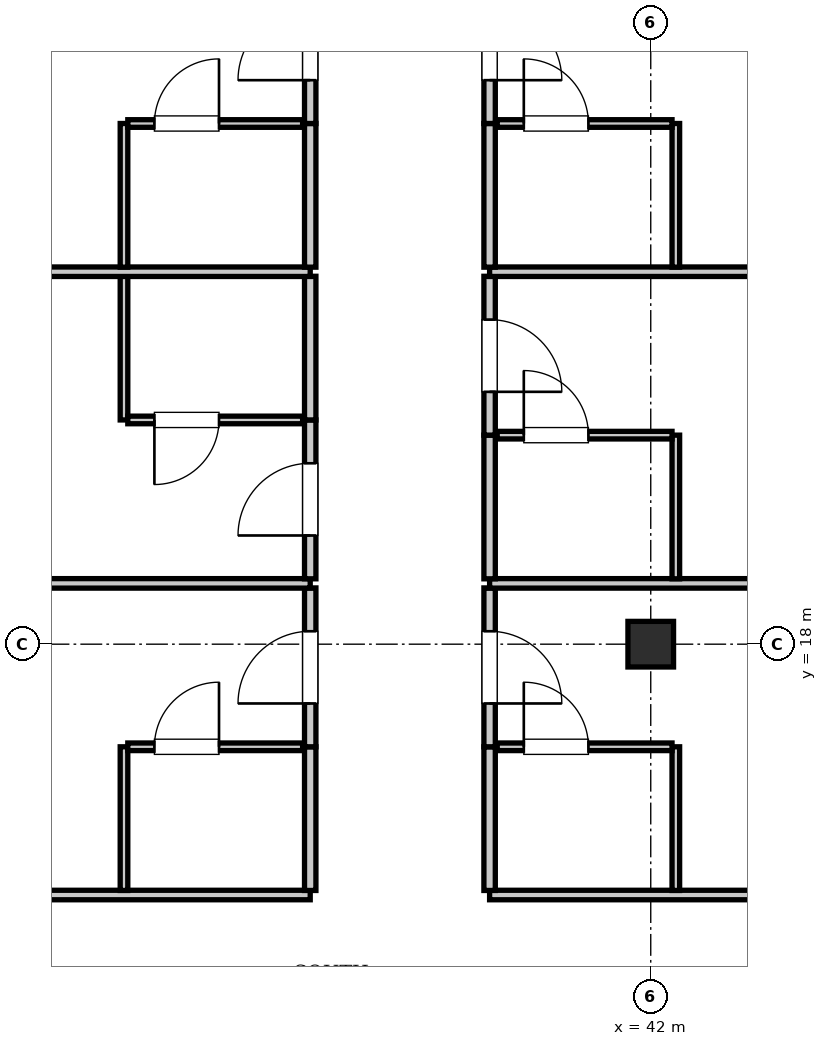
"""IFC4 building model, lengths in metres.
Left out: names, types, materials, properties, quantities, classifications, styles, units other than length and angle.
Written with IfcOpenShell. Run it as: python <this file> out.ifc"""

import sys

from ifc_helpers import new_model, si_unit, direction, frame, frame_2d, origin, origin_2d, place, context, subcontext, project, spatial, rectangle, i_section, extrude, element, fill, save


model = new_model("IFC4")
c1 = context("Model", 3, precision=1e-05, world=origin(), true_north=direction((0.0, 1.0)))
c2 = subcontext(c1, "Body", "Model", "MODEL_VIEW")
j1 = project(units=[si_unit("LENGTHUNIT", "METRE"), si_unit("PLANEANGLEUNIT", "RADIAN")], contexts=[c1])
p1 = place(None, origin())
s1 = spatial("IfcSite", under=j1, at=p1, CompositionType="ELEMENT")
p2 = place(p1, origin())
s2 = spatial("IfcBuilding", under=s1, at=p2, CompositionType="ELEMENT")
p3 = place(p2, frame((0.0, 0.0, 181.3)))
s3 = spatial("IfcBuildingStorey", under=s2, at=p3, CompositionType="ELEMENT", Elevation=181.3)
p4 = place(p3, frame((42.0, 18.0, 0.0), z_axis=(0.0, 0.0, 1.0), x_axis=(1.0, 0.0, 0.0)))
e1 = element("IfcColumn", 1, at=p4, inside=s3, PredefinedType="COLUMN", context=c2, shape_type="SweptSolid", body=[
    extrude(i_section(OverallWidth=0.6, OverallDepth=0.6, WebThickness=0.025, FlangeThickness=0.038, at=origin_2d()), origin(), (0.0, 0.0, 1.0), 3.85),
])
p5 = place(p3, frame((13.2, 14.7, 0.0), z_axis=(0.0, 0.0, 1.0), x_axis=(1.0, 0.0, 0.0)))
e2 = element("IfcWall", 2, at=p5, inside=s3, PredefinedType="PARTITIONING", context=c2, shape_type="SweptSolid", body=[
    extrude(rectangle(XDim=24.32, YDim=0.125, at=frame_2d((12.16, 0.0))), origin(), (0.0, 0.0, 1.0), 3.61),
])
p6 = place(p3, frame((39.88, 14.7, 0.0), z_axis=(0.0, 0.0, 1.0), x_axis=(1.0, 0.0, 0.0)))
e3 = element("IfcWall", 3, at=p6, inside=s3, PredefinedType="PARTITIONING", context=c2, shape_type="SweptSolid", body=[
    extrude(rectangle(XDim=22.52, YDim=0.125, at=frame_2d((11.26, 0.0))), origin(), (0.0, 0.0, 1.0), 3.61),
])
p7 = place(p3, frame((37.52, 14.76, 0.0), z_axis=(0.0, 0.0, 1.0), x_axis=(0.0, 1.0, 0.0)))
e4 = element("IfcWall", 4, at=p7, inside=s3, PredefinedType="PARTITIONING", context=c2, shape_type="SweptSolid", body=[
    extrude(rectangle(XDim=1.89, YDim=0.15, at=frame_2d((0.945, 0.0))), origin(), (0.0, 0.0, 1.0), 3.61),
])
p8 = place(p3, frame((37.52, 16.65, 0.0), z_axis=(0.0, 0.0, 1.0), x_axis=(0.0, 1.0, 0.0)))
e5 = element("IfcWall", 5, at=p8, inside=s3, PredefinedType="PARTITIONING", context=c2, shape_type="SweptSolid", body=[
    extrude(rectangle(XDim=2.09, YDim=0.15, at=frame_2d((1.045, 0.0))), origin(), (0.0, 0.0, 1.0), 3.61),
])
p9 = place(p8, frame((0.57, 0.0, 0.0)))
e6 = element("IfcOpeningElement", 6, at=p9, cuts=e5, PredefinedType="OPENING", context=c2, shape_type="SweptSolid", body=[
    extrude(rectangle(XDim=0.95, YDim=2.15, at=frame_2d((0.475, 1.075))), frame((0.0, 0.085, 0.0), z_axis=(0.0, -1.0, 0.0), x_axis=(1.0, 0.0, 0.0)), (0.0, 0.0, 1.0), 0.17),
])
p10 = place(p3, frame((35.07, 14.76, 0.0), z_axis=(0.0, 0.0, 1.0), x_axis=(0.0, 1.0, 0.0)))
e7 = element("IfcWall", 7, at=p10, inside=s3, PredefinedType="PARTITIONING", context=c2, shape_type="SweptSolid", body=[
    extrude(rectangle(XDim=1.89, YDim=0.1, at=frame_2d((0.945, 0.0))), origin(), (0.0, 0.0, 1.0), 3.61),
])
p11 = place(p3, frame((35.12, 16.65, 0.0), z_axis=(0.0, 0.0, 1.0), x_axis=(1.0, 0.0, 0.0)))
e8 = element("IfcWall", 8, at=p11, inside=s3, PredefinedType="PARTITIONING", context=c2, shape_type="SweptSolid", body=[
    extrude(rectangle(XDim=2.3, YDim=0.1, at=frame_2d((1.15, 0.0))), origin(), (0.0, 0.0, 1.0), 3.61),
])
p12 = place(p11, frame((0.35, 0.0, 0.0)))
e9 = element("IfcOpeningElement", 9, at=p12, cuts=e8, PredefinedType="OPENING", context=c2, shape_type="SweptSolid", body=[
    extrude(rectangle(XDim=0.85, YDim=2.1, at=frame_2d((0.425, 1.05))), frame((0.0, 0.06, 0.0), z_axis=(0.0, -1.0, 0.0), x_axis=(1.0, 0.0, 0.0)), (0.0, 0.0, 1.0), 0.12),
])
p13 = place(p3, frame((39.88, 14.76, 0.0), z_axis=(0.0, 0.0, 1.0), x_axis=(0.0, 1.0, 0.0)))
e10 = element("IfcWall", 10, at=p13, inside=s3, PredefinedType="PARTITIONING", context=c2, shape_type="SweptSolid", body=[
    extrude(rectangle(XDim=1.89, YDim=0.15, at=frame_2d((0.945, 0.0))), origin(), (0.0, 0.0, 1.0), 3.61),
])
p14 = place(p3, frame((39.88, 16.65, 0.0), z_axis=(0.0, 0.0, 1.0), x_axis=(0.0, 1.0, 0.0)))
e11 = element("IfcWall", 11, at=p14, inside=s3, PredefinedType="PARTITIONING", context=c2, shape_type="SweptSolid", body=[
    extrude(rectangle(XDim=2.09, YDim=0.15, at=frame_2d((1.045, 0.0))), origin(), (0.0, 0.0, 1.0), 3.61),
])
p15 = place(p14, frame((0.57, 0.0, 0.0)))
e12 = element("IfcOpeningElement", 12, at=p15, cuts=e11, PredefinedType="OPENING", context=c2, shape_type="SweptSolid", body=[
    extrude(rectangle(XDim=0.95, YDim=2.15, at=frame_2d((0.475, 1.075))), frame((0.0, 0.085, 0.0), z_axis=(0.0, -1.0, 0.0), x_axis=(1.0, 0.0, 0.0)), (0.0, 0.0, 1.0), 0.17),
])
p16 = place(p3, frame((42.33, 14.76, 0.0), z_axis=(0.0, 0.0, 1.0), x_axis=(0.0, 1.0, 0.0)))
e13 = element("IfcWall", 13, at=p16, inside=s3, PredefinedType="PARTITIONING", context=c2, shape_type="SweptSolid", body=[
    extrude(rectangle(XDim=1.89, YDim=0.1, at=frame_2d((0.945, 0.0))), origin(), (0.0, 0.0, 1.0), 3.61),
])
p17 = place(p3, frame((39.98, 16.65, 0.0), z_axis=(0.0, 0.0, 1.0), x_axis=(1.0, 0.0, 0.0)))
e14 = element("IfcWall", 14, at=p17, inside=s3, PredefinedType="PARTITIONING", context=c2, shape_type="SweptSolid", body=[
    extrude(rectangle(XDim=2.3, YDim=0.1, at=frame_2d((1.15, 0.0))), origin(), (0.0, 0.0, 1.0), 3.61),
])
p18 = place(p17, frame((0.35, 0.0, 0.0)))
e15 = element("IfcOpeningElement", 15, at=p18, cuts=e14, PredefinedType="OPENING", context=c2, shape_type="SweptSolid", body=[
    extrude(rectangle(XDim=0.85, YDim=2.1, at=frame_2d((0.425, 1.05))), frame((0.0, 0.06, 0.0), z_axis=(0.0, -1.0, 0.0), x_axis=(1.0, 0.0, 0.0)), (0.0, 0.0, 1.0), 0.12),
])
p19 = place(p3, frame((13.2, 18.8, 0.0), z_axis=(0.0, 0.0, 1.0), x_axis=(1.0, 0.0, 0.0)))
e16 = element("IfcWall", 16, at=p19, inside=s3, PredefinedType="PARTITIONING", context=c2, shape_type="SweptSolid", body=[
    extrude(rectangle(XDim=24.32, YDim=0.125, at=frame_2d((12.16, 0.0))), origin(), (0.0, 0.0, 1.0), 3.61),
])
p20 = place(p3, frame((39.88, 18.8, 0.0), z_axis=(0.0, 0.0, 1.0), x_axis=(1.0, 0.0, 0.0)))
e17 = element("IfcWall", 17, at=p20, inside=s3, PredefinedType="PARTITIONING", context=c2, shape_type="SweptSolid", body=[
    extrude(rectangle(XDim=22.52, YDim=0.125, at=frame_2d((11.26, 0.0))), origin(), (0.0, 0.0, 1.0), 3.61),
])
p21 = place(p3, frame((37.52, 18.86, 0.0), z_axis=(0.0, 0.0, 1.0), x_axis=(0.0, 1.0, 0.0)))
e18 = element("IfcWall", 18, at=p21, inside=s3, PredefinedType="PARTITIONING", context=c2, shape_type="SweptSolid", body=[
    extrude(rectangle(XDim=2.09, YDim=0.15, at=frame_2d((1.045, 0.0))), origin(), (0.0, 0.0, 1.0), 3.61),
])
p22 = place(p21, frame((0.57, 0.0, 0.0)))
e19 = element("IfcOpeningElement", 19, at=p22, cuts=e18, PredefinedType="OPENING", context=c2, shape_type="SweptSolid", body=[
    extrude(rectangle(XDim=0.95, YDim=2.15, at=frame_2d((0.475, 1.075))), frame((0.0, 0.085, 0.0), z_axis=(0.0, -1.0, 0.0), x_axis=(1.0, 0.0, 0.0)), (0.0, 0.0, 1.0), 0.17),
])
p23 = place(p3, frame((37.52, 20.95, 0.0), z_axis=(0.0, 0.0, 1.0), x_axis=(0.0, 1.0, 0.0)))
e20 = element("IfcWall", 20, at=p23, inside=s3, PredefinedType="PARTITIONING", context=c2, shape_type="SweptSolid", body=[
    extrude(rectangle(XDim=1.89, YDim=0.15, at=frame_2d((0.945, 0.0))), origin(), (0.0, 0.0, 1.0), 3.61),
])
p24 = place(p3, frame((35.07, 20.95, 0.0), z_axis=(0.0, 0.0, 1.0), x_axis=(0.0, 1.0, 0.0)))
e21 = element("IfcWall", 21, at=p24, inside=s3, PredefinedType="PARTITIONING", context=c2, shape_type="SweptSolid", body=[
    extrude(rectangle(XDim=1.89, YDim=0.1, at=frame_2d((0.945, 0.0))), origin(), (0.0, 0.0, 1.0), 3.61),
])
p25 = place(p3, frame((35.12, 20.95, 0.0), z_axis=(0.0, 0.0, 1.0), x_axis=(1.0, 0.0, 0.0)))
e22 = element("IfcWall", 22, at=p25, inside=s3, PredefinedType="PARTITIONING", context=c2, shape_type="SweptSolid", body=[
    extrude(rectangle(XDim=2.3, YDim=0.1, at=frame_2d((1.15, 0.0))), origin(), (0.0, 0.0, 1.0), 3.61),
])
p26 = place(p25, frame((0.35, 0.0, 0.0)))
e23 = element("IfcOpeningElement", 23, at=p26, cuts=e22, PredefinedType="OPENING", context=c2, shape_type="SweptSolid", body=[
    extrude(rectangle(XDim=0.85, YDim=2.1, at=frame_2d((0.425, 1.05))), frame((0.0, 0.06, 0.0), z_axis=(0.0, -1.0, 0.0), x_axis=(1.0, 0.0, 0.0)), (0.0, 0.0, 1.0), 0.12),
])
p27 = place(p3, frame((39.88, 18.86, 0.0), z_axis=(0.0, 0.0, 1.0), x_axis=(0.0, 1.0, 0.0)))
e24 = element("IfcWall", 24, at=p27, inside=s3, PredefinedType="PARTITIONING", context=c2, shape_type="SweptSolid", body=[
    extrude(rectangle(XDim=1.89, YDim=0.15, at=frame_2d((0.945, 0.0))), origin(), (0.0, 0.0, 1.0), 3.61),
])
p28 = place(p3, frame((39.88, 20.75, 0.0), z_axis=(0.0, 0.0, 1.0), x_axis=(0.0, 1.0, 0.0)))
e25 = element("IfcWall", 25, at=p28, inside=s3, PredefinedType="PARTITIONING", context=c2, shape_type="SweptSolid", body=[
    extrude(rectangle(XDim=2.09, YDim=0.15, at=frame_2d((1.045, 0.0))), origin(), (0.0, 0.0, 1.0), 3.61),
])
p29 = place(p28, frame((0.57, 0.0, 0.0)))
e26 = element("IfcOpeningElement", 26, at=p29, cuts=e25, PredefinedType="OPENING", context=c2, shape_type="SweptSolid", body=[
    extrude(rectangle(XDim=0.95, YDim=2.15, at=frame_2d((0.475, 1.075))), frame((0.0, 0.085, 0.0), z_axis=(0.0, -1.0, 0.0), x_axis=(1.0, 0.0, 0.0)), (0.0, 0.0, 1.0), 0.17),
])
p30 = place(p3, frame((42.33, 18.86, 0.0), z_axis=(0.0, 0.0, 1.0), x_axis=(0.0, 1.0, 0.0)))
e27 = element("IfcWall", 27, at=p30, inside=s3, PredefinedType="PARTITIONING", context=c2, shape_type="SweptSolid", body=[
    extrude(rectangle(XDim=1.89, YDim=0.1, at=frame_2d((0.945, 0.0))), origin(), (0.0, 0.0, 1.0), 3.61),
])
p31 = place(p3, frame((39.98, 20.75, 0.0), z_axis=(0.0, 0.0, 1.0), x_axis=(1.0, 0.0, 0.0)))
e28 = element("IfcWall", 28, at=p31, inside=s3, PredefinedType="PARTITIONING", context=c2, shape_type="SweptSolid", body=[
    extrude(rectangle(XDim=2.3, YDim=0.1, at=frame_2d((1.15, 0.0))), origin(), (0.0, 0.0, 1.0), 3.61),
])
p32 = place(p31, frame((0.35, 0.0, 0.0)))
e29 = element("IfcOpeningElement", 29, at=p32, cuts=e28, PredefinedType="OPENING", context=c2, shape_type="SweptSolid", body=[
    extrude(rectangle(XDim=0.85, YDim=2.1, at=frame_2d((0.425, 1.05))), frame((0.0, 0.06, 0.0), z_axis=(0.0, -1.0, 0.0), x_axis=(1.0, 0.0, 0.0)), (0.0, 0.0, 1.0), 0.12),
])
p33 = place(p3, frame((13.2, 22.9, 0.0), z_axis=(0.0, 0.0, 1.0), x_axis=(1.0, 0.0, 0.0)))
e30 = element("IfcWall", 30, at=p33, inside=s3, PredefinedType="PARTITIONING", context=c2, shape_type="SweptSolid", body=[
    extrude(rectangle(XDim=24.32, YDim=0.125, at=frame_2d((12.16, 0.0))), origin(), (0.0, 0.0, 1.0), 3.61),
])
p34 = place(p3, frame((39.88, 22.9, 0.0), z_axis=(0.0, 0.0, 1.0), x_axis=(1.0, 0.0, 0.0)))
e31 = element("IfcWall", 31, at=p34, inside=s3, PredefinedType="PARTITIONING", context=c2, shape_type="SweptSolid", body=[
    extrude(rectangle(XDim=22.52, YDim=0.125, at=frame_2d((11.26, 0.0))), origin(), (0.0, 0.0, 1.0), 3.61),
])
p35 = place(p3, frame((37.52, 22.96, 0.0), z_axis=(0.0, 0.0, 1.0), x_axis=(0.0, 1.0, 0.0)))
e32 = element("IfcWall", 32, at=p35, inside=s3, PredefinedType="PARTITIONING", context=c2, shape_type="SweptSolid", body=[
    extrude(rectangle(XDim=1.89, YDim=0.15, at=frame_2d((0.945, 0.0))), origin(), (0.0, 0.0, 1.0), 3.61),
])
p36 = place(p3, frame((37.52, 24.85, 0.0), z_axis=(0.0, 0.0, 1.0), x_axis=(0.0, 1.0, 0.0)))
e33 = element("IfcWall", 33, at=p36, inside=s3, PredefinedType="PARTITIONING", context=c2, shape_type="SweptSolid", body=[
    extrude(rectangle(XDim=2.09, YDim=0.15, at=frame_2d((1.045, 0.0))), origin(), (0.0, 0.0, 1.0), 3.61),
])
p37 = place(p36, frame((0.57, 0.0, 0.0)))
e34 = element("IfcOpeningElement", 34, at=p37, cuts=e33, PredefinedType="OPENING", context=c2, shape_type="SweptSolid", body=[
    extrude(rectangle(XDim=0.95, YDim=2.15, at=frame_2d((0.475, 1.075))), frame((0.0, 0.085, 0.0), z_axis=(0.0, -1.0, 0.0), x_axis=(1.0, 0.0, 0.0)), (0.0, 0.0, 1.0), 0.17),
])
p38 = place(p3, frame((35.07, 22.96, 0.0), z_axis=(0.0, 0.0, 1.0), x_axis=(0.0, 1.0, 0.0)))
e35 = element("IfcWall", 35, at=p38, inside=s3, PredefinedType="PARTITIONING", context=c2, shape_type="SweptSolid", body=[
    extrude(rectangle(XDim=1.89, YDim=0.1, at=frame_2d((0.945, 0.0))), origin(), (0.0, 0.0, 1.0), 3.61),
])
p39 = place(p3, frame((35.12, 24.85, 0.0), z_axis=(0.0, 0.0, 1.0), x_axis=(1.0, 0.0, 0.0)))
e36 = element("IfcWall", 36, at=p39, inside=s3, PredefinedType="PARTITIONING", context=c2, shape_type="SweptSolid", body=[
    extrude(rectangle(XDim=2.3, YDim=0.1, at=frame_2d((1.15, 0.0))), origin(), (0.0, 0.0, 1.0), 3.61),
])
p40 = place(p39, frame((0.35, 0.0, 0.0)))
e37 = element("IfcOpeningElement", 37, at=p40, cuts=e36, PredefinedType="OPENING", context=c2, shape_type="SweptSolid", body=[
    extrude(rectangle(XDim=0.85, YDim=2.1, at=frame_2d((0.425, 1.05))), frame((0.0, 0.06, 0.0), z_axis=(0.0, -1.0, 0.0), x_axis=(1.0, 0.0, 0.0)), (0.0, 0.0, 1.0), 0.12),
])
p41 = place(p3, frame((39.88, 22.96, 0.0), z_axis=(0.0, 0.0, 1.0), x_axis=(0.0, 1.0, 0.0)))
e38 = element("IfcWall", 38, at=p41, inside=s3, PredefinedType="PARTITIONING", context=c2, shape_type="SweptSolid", body=[
    extrude(rectangle(XDim=1.89, YDim=0.15, at=frame_2d((0.945, 0.0))), origin(), (0.0, 0.0, 1.0), 3.61),
])
p42 = place(p3, frame((39.88, 24.85, 0.0), z_axis=(0.0, 0.0, 1.0), x_axis=(0.0, 1.0, 0.0)))
e39 = element("IfcWall", 39, at=p42, inside=s3, PredefinedType="PARTITIONING", context=c2, shape_type="SweptSolid", body=[
    extrude(rectangle(XDim=2.09, YDim=0.15, at=frame_2d((1.045, 0.0))), origin(), (0.0, 0.0, 1.0), 3.61),
])
p43 = place(p42, frame((0.57, 0.0, 0.0)))
e40 = element("IfcOpeningElement", 40, at=p43, cuts=e39, PredefinedType="OPENING", context=c2, shape_type="SweptSolid", body=[
    extrude(rectangle(XDim=0.95, YDim=2.15, at=frame_2d((0.475, 1.075))), frame((0.0, 0.085, 0.0), z_axis=(0.0, -1.0, 0.0), x_axis=(1.0, 0.0, 0.0)), (0.0, 0.0, 1.0), 0.17),
])
p44 = place(p3, frame((42.33, 22.96, 0.0), z_axis=(0.0, 0.0, 1.0), x_axis=(0.0, 1.0, 0.0)))
e41 = element("IfcWall", 41, at=p44, inside=s3, PredefinedType="PARTITIONING", context=c2, shape_type="SweptSolid", body=[
    extrude(rectangle(XDim=1.89, YDim=0.1, at=frame_2d((0.945, 0.0))), origin(), (0.0, 0.0, 1.0), 3.61),
])
p45 = place(p3, frame((39.98, 24.85, 0.0), z_axis=(0.0, 0.0, 1.0), x_axis=(1.0, 0.0, 0.0)))
e42 = element("IfcWall", 42, at=p45, inside=s3, PredefinedType="PARTITIONING", context=c2, shape_type="SweptSolid", body=[
    extrude(rectangle(XDim=2.3, YDim=0.1, at=frame_2d((1.15, 0.0))), origin(), (0.0, 0.0, 1.0), 3.61),
])
p46 = place(p45, frame((0.35, 0.0, 0.0)))
e43 = element("IfcOpeningElement", 43, at=p46, cuts=e42, PredefinedType="OPENING", context=c2, shape_type="SweptSolid", body=[
    extrude(rectangle(XDim=0.85, YDim=2.1, at=frame_2d((0.425, 1.05))), frame((0.0, 0.06, 0.0), z_axis=(0.0, -1.0, 0.0), x_axis=(1.0, 0.0, 0.0)), (0.0, 0.0, 1.0), 0.12),
])
p47 = place(p12, origin())
e44 = element("IfcDoor", 44, at=p47, inside=s3, OperationType="SINGLE_SWING_RIGHT", PredefinedType="DOOR", context=c2, shape_type="SweptSolid", body=[
    extrude(rectangle(XDim=0.85, YDim=2.1, at=frame_2d((0.425, 1.05))), frame((0.0, 0.025, 0.0), z_axis=(0.0, -1.0, 0.0), x_axis=(1.0, 0.0, 0.0)), (0.0, 0.0, 1.0), 0.05),
])
fill(e9, e44)
p48 = place(p9, origin())
e45 = element("IfcDoor", 45, at=p48, inside=s3, OperationType="SINGLE_SWING_LEFT", PredefinedType="DOOR", context=c2, shape_type="SweptSolid", body=[
    extrude(rectangle(XDim=0.95, YDim=2.15, at=frame_2d((0.475, 1.075))), frame((0.0, 0.025, 0.0), z_axis=(0.0, -1.0, 0.0), x_axis=(1.0, 0.0, 0.0)), (0.0, 0.0, 1.0), 0.05),
])
fill(e6, e45)
p49 = place(p18, origin())
e46 = element("IfcDoor", 46, at=p49, inside=s3, OperationType="SINGLE_SWING_LEFT", PredefinedType="DOOR", context=c2, shape_type="SweptSolid", body=[
    extrude(rectangle(XDim=0.85, YDim=2.1, at=frame_2d((0.425, 1.05))), frame((0.0, 0.025, 0.0), z_axis=(0.0, -1.0, 0.0), x_axis=(1.0, 0.0, 0.0)), (0.0, 0.0, 1.0), 0.05),
])
fill(e15, e46)
p50 = place(p15, frame((0.95, 0.0, 0.0), z_axis=(0.0, 0.0, 1.0), x_axis=(-1.0, 0.0, 0.0)))
e47 = element("IfcDoor", 47, at=p50, inside=s3, OperationType="SINGLE_SWING_RIGHT", PredefinedType="DOOR", context=c2, shape_type="SweptSolid", body=[
    extrude(rectangle(XDim=0.95, YDim=2.15, at=frame_2d((0.475, 1.075))), frame((0.0, 0.025, 0.0), z_axis=(0.0, -1.0, 0.0), x_axis=(1.0, 0.0, 0.0)), (0.0, 0.0, 1.0), 0.05),
])
fill(e12, e47)
p51 = place(p26, frame((0.85, 0.0, 0.0), z_axis=(0.0, 0.0, 1.0), x_axis=(-1.0, 0.0, 0.0)))
e48 = element("IfcDoor", 48, at=p51, inside=s3, OperationType="SINGLE_SWING_RIGHT", PredefinedType="DOOR", context=c2, shape_type="SweptSolid", body=[
    extrude(rectangle(XDim=0.85, YDim=2.1, at=frame_2d((0.425, 1.05))), frame((0.0, 0.025, 0.0), z_axis=(0.0, -1.0, 0.0), x_axis=(1.0, 0.0, 0.0)), (0.0, 0.0, 1.0), 0.05),
])
fill(e23, e48)
p52 = place(p22, origin())
e49 = element("IfcDoor", 49, at=p52, inside=s3, OperationType="SINGLE_SWING_LEFT", PredefinedType="DOOR", context=c2, shape_type="SweptSolid", body=[
    extrude(rectangle(XDim=0.95, YDim=2.15, at=frame_2d((0.475, 1.075))), frame((0.0, 0.025, 0.0), z_axis=(0.0, -1.0, 0.0), x_axis=(1.0, 0.0, 0.0)), (0.0, 0.0, 1.0), 0.05),
])
fill(e19, e49)
p53 = place(p32, origin())
e50 = element("IfcDoor", 50, at=p53, inside=s3, OperationType="SINGLE_SWING_LEFT", PredefinedType="DOOR", context=c2, shape_type="SweptSolid", body=[
    extrude(rectangle(XDim=0.85, YDim=2.1, at=frame_2d((0.425, 1.05))), frame((0.0, 0.025, 0.0), z_axis=(0.0, -1.0, 0.0), x_axis=(1.0, 0.0, 0.0)), (0.0, 0.0, 1.0), 0.05),
])
fill(e29, e50)
p54 = place(p29, frame((0.95, 0.0, 0.0), z_axis=(0.0, 0.0, 1.0), x_axis=(-1.0, 0.0, 0.0)))
e51 = element("IfcDoor", 51, at=p54, inside=s3, OperationType="SINGLE_SWING_RIGHT", PredefinedType="DOOR", context=c2, shape_type="SweptSolid", body=[
    extrude(rectangle(XDim=0.95, YDim=2.15, at=frame_2d((0.475, 1.075))), frame((0.0, 0.025, 0.0), z_axis=(0.0, -1.0, 0.0), x_axis=(1.0, 0.0, 0.0)), (0.0, 0.0, 1.0), 0.05),
])
fill(e26, e51)
p55 = place(p40, origin())
e52 = element("IfcDoor", 52, at=p55, inside=s3, OperationType="SINGLE_SWING_RIGHT", PredefinedType="DOOR", context=c2, shape_type="SweptSolid", body=[
    extrude(rectangle(XDim=0.85, YDim=2.1, at=frame_2d((0.425, 1.05))), frame((0.0, 0.025, 0.0), z_axis=(0.0, -1.0, 0.0), x_axis=(1.0, 0.0, 0.0)), (0.0, 0.0, 1.0), 0.05),
])
fill(e37, e52)
p56 = place(p37, origin())
e53 = element("IfcDoor", 53, at=p56, inside=s3, OperationType="SINGLE_SWING_LEFT", PredefinedType="DOOR", context=c2, shape_type="SweptSolid", body=[
    extrude(rectangle(XDim=0.95, YDim=2.15, at=frame_2d((0.475, 1.075))), frame((0.0, 0.025, 0.0), z_axis=(0.0, -1.0, 0.0), x_axis=(1.0, 0.0, 0.0)), (0.0, 0.0, 1.0), 0.05),
])
fill(e34, e53)
p57 = place(p46, origin())
e54 = element("IfcDoor", 54, at=p57, inside=s3, OperationType="SINGLE_SWING_LEFT", PredefinedType="DOOR", context=c2, shape_type="SweptSolid", body=[
    extrude(rectangle(XDim=0.85, YDim=2.1, at=frame_2d((0.425, 1.05))), frame((0.0, 0.025, 0.0), z_axis=(0.0, -1.0, 0.0), x_axis=(1.0, 0.0, 0.0)), (0.0, 0.0, 1.0), 0.05),
])
fill(e43, e54)
p58 = place(p43, frame((0.95, 0.0, 0.0), z_axis=(0.0, 0.0, 1.0), x_axis=(-1.0, 0.0, 0.0)))
e55 = element("IfcDoor", 55, at=p58, inside=s3, OperationType="SINGLE_SWING_RIGHT", PredefinedType="DOOR", context=c2, shape_type="SweptSolid", body=[
    extrude(rectangle(XDim=0.95, YDim=2.15, at=frame_2d((0.475, 1.075))), frame((0.0, 0.025, 0.0), z_axis=(0.0, -1.0, 0.0), x_axis=(1.0, 0.0, 0.0)), (0.0, 0.0, 1.0), 0.05),
])
fill(e40, e55)
save(model, sys.argv[1])
